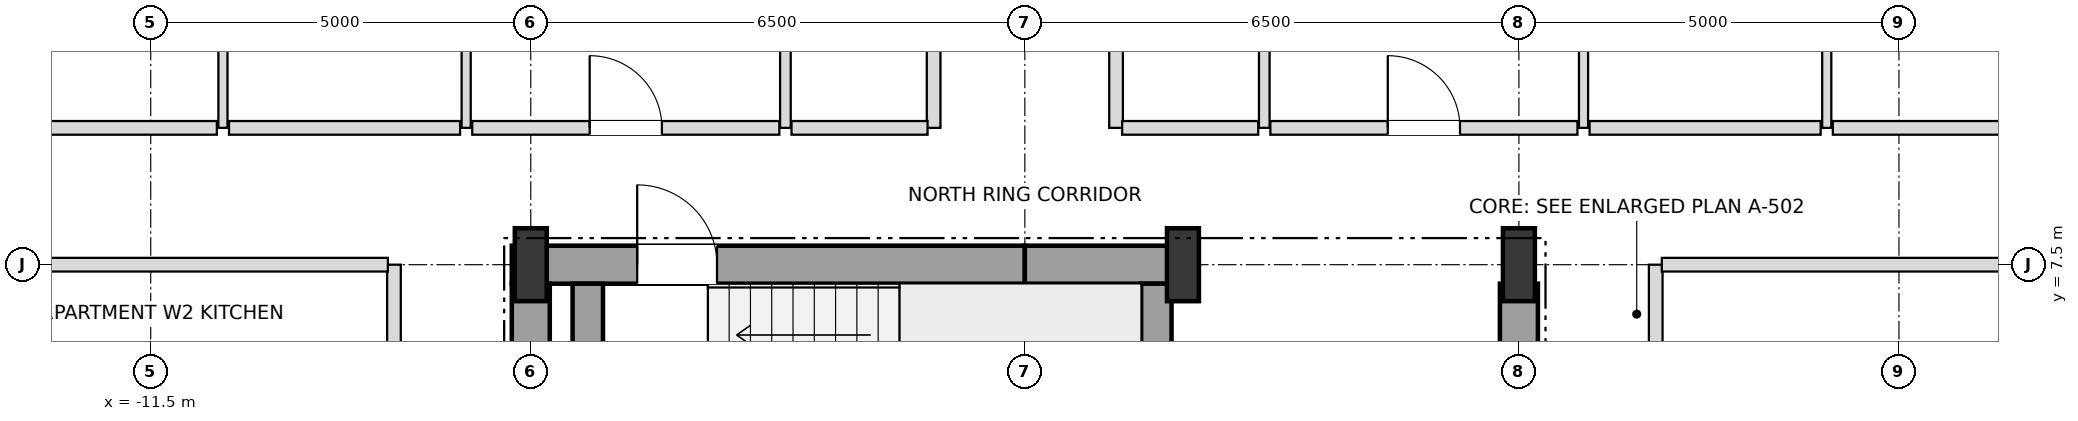
"""IFC4 building model, lengths in metres.
Left out: names, types, materials, properties, quantities, classifications, styles, units other than length and angle.
Written with IfcOpenShell. Run it as: python <this file> out.ifc"""

import sys

from ifc_helpers import new_model, si_unit, direction, frame, frame_2d, origin, origin_2d, place, context, subcontext, project, spatial, rectangle, i_section, extrude, element, fill, save


model = new_model("IFC4")
c1 = context("Model", 3, precision=1e-05, world=origin(), true_north=direction((0.0, 1.0)))
c2 = subcontext(c1, "Body", "Model", "MODEL_VIEW")
j1 = project(units=[si_unit("LENGTHUNIT", "METRE"), si_unit("PLANEANGLEUNIT", "RADIAN")], contexts=[c1])
p1 = place(None, origin())
s1 = spatial("IfcSite", under=j1, at=p1, CompositionType="ELEMENT")
p2 = place(p1, origin())
s2 = spatial("IfcBuilding", under=s1, at=p2, CompositionType="ELEMENT")
p3 = place(p2, frame((0.0, 0.0, 99.0)))
s3 = spatial("IfcBuildingStorey", under=s2, at=p3, CompositionType="ELEMENT", Elevation=99.0)
for number, where, z_axis, x_axis in (
    (1, (-6.5, 7.5, 0.0), (0.0, 0.0, 1.0), (1.0, 0.0, 0.0)),
    (2, (2.08, 7.5, 0.0), (0.0, 0.0, 1.0), (1.0, 0.0, 0.0)),
    (3, (6.5, 7.5, 0.0), (0.0, 0.0, 1.0), (1.0, 0.0, 0.0)),
):
    element("IfcColumn", number, at=place(p3, frame(where, z_axis=z_axis, x_axis=x_axis)), inside=s3, PredefinedType="COLUMN", context=c2, shape_type="SweptSolid", body=[
        extrude(i_section(OverallWidth=0.42, OverallDepth=0.96, WebThickness=0.022, FlangeThickness=0.034, at=origin_2d()), origin(), (0.0, 0.0, 1.0), 3.6),
    ])
p4 = place(p3, frame((-6.75, 7.5, 0.0), z_axis=(0.0, 0.0, 1.0), x_axis=(1.0, 0.0, 0.0)))
e4 = element("IfcWall", 4, at=p4, inside=s3, PredefinedType="SHEAR", context=c2, shape_type="SweptSolid", body=[
    extrude(rectangle(XDim=6.75, YDim=0.5, at=frame_2d((3.375, 0.0))), origin(), (0.0, 0.0, 1.0), 3.38),
])
p5 = place(p4, frame((1.65, 0.0, 0.0)))
e5 = element("IfcOpeningElement", 5, at=p5, cuts=e4, PredefinedType="OPENING", context=c2, shape_type="SweptSolid", body=[
    extrude(rectangle(XDim=1.05, YDim=2.15, at=frame_2d((0.525, 1.075))), frame((0.0, 0.26, 0.0), z_axis=(0.0, -1.0, 0.0), x_axis=(1.0, 0.0, 0.0)), (0.0, 0.0, 1.0), 0.52),
])
p6 = place(p3, frame((0.0, 7.5, 0.0), z_axis=(0.0, 0.0, 1.0), x_axis=(1.0, 0.0, 0.0)))
e6 = element("IfcWall", 6, at=p6, inside=s3, PredefinedType="SHEAR", context=c2, shape_type="SweptSolid", body=[
    extrude(rectangle(XDim=2.08, YDim=0.5, at=frame_2d((1.04, 0.0))), origin(), (0.0, 0.0, 1.0), 3.38),
])
for number, where, z_axis, x_axis in (
    (7, (-6.5, 3.95, 0.0), (0.0, 0.0, 1.0), (0.0, 1.0, 0.0)),
    (8, (6.5, 3.95, 0.0), (0.0, 0.0, 1.0), (0.0, 1.0, 0.0)),
):
    element("IfcWall", number, at=place(p3, frame(where, z_axis=z_axis, x_axis=x_axis)), inside=s3, PredefinedType="SHEAR", context=c2, shape_type="SweptSolid", body=[
        extrude(rectangle(XDim=3.3, YDim=0.5, at=frame_2d((1.65, 0.0))), origin(), (0.0, 0.0, 1.0), 3.38),
    ])
for number, where, z_axis, x_axis in (
    (9, (1.73, 3.95, 0.0), (0.0, 0.0, 1.0), (0.0, 1.0, 0.0)),
    (10, (-5.75, 3.95, 0.0), (0.0, 0.0, 1.0), (0.0, 1.0, 0.0)),
):
    element("IfcWall", number, at=place(p3, frame(where, z_axis=z_axis, x_axis=x_axis)), inside=s3, PredefinedType="SHEAR", context=c2, shape_type="SweptSolid", body=[
        extrude(rectangle(XDim=3.3, YDim=0.4, at=frame_2d((1.65, 0.0))), origin(), (0.0, 0.0, 1.0), 3.38),
    ])
p7 = place(p3, frame((-10.55, 9.3, 0.0), z_axis=(0.0, 0.0, 1.0), x_axis=(0.0, 1.0, 0.0)))
e11 = element("IfcWall", 11, at=p7, inside=s3, PredefinedType="PARTITIONING", context=c2, shape_type="SweptSolid", body=[
    extrude(rectangle(XDim=13.85, YDim=0.12, at=frame_2d((6.925, 0.0))), origin(), (0.0, 0.0, 1.0), 2.816),
])
p8 = place(p7, frame((4.249, 0.0, 0.0)))
e12 = element("IfcOpeningElement", 12, at=p8, cuts=e11, PredefinedType="OPENING", context=c2, shape_type="SweptSolid", body=[
    extrude(rectangle(XDim=0.9, YDim=2.1, at=frame_2d((0.45, 1.05))), frame((0.0, 0.07, 0.0), z_axis=(0.0, -1.0, 0.0), x_axis=(1.0, 0.0, 0.0)), (0.0, 0.0, 1.0), 0.14),
])
p9 = place(p7, frame((11.551, 0.0, 0.0)))
e13 = element("IfcOpeningElement", 13, at=p9, cuts=e11, PredefinedType="OPENING", context=c2, shape_type="SweptSolid", body=[
    extrude(rectangle(XDim=0.9, YDim=2.1, at=frame_2d((0.45, 1.05))), frame((0.0, 0.07, 0.0), z_axis=(0.0, -1.0, 0.0), x_axis=(1.0, 0.0, 0.0)), (0.0, 0.0, 1.0), 0.14),
])
p10 = place(p3, frame((-8.3, -7.5, 0.0), z_axis=(0.0, 0.0, 1.0), x_axis=(0.0, 1.0, 0.0)))
e14 = element("IfcWall", 14, at=p10, inside=s3, PredefinedType="PARTITIONING", context=c2, shape_type="SweptSolid", body=[
    extrude(rectangle(XDim=15.0, YDim=0.18, at=frame_2d((7.5, 0.0))), origin(), (0.0, 0.0, 1.0), 3.38),
])
p11 = place(p10, frame((3.145, 0.0, 0.0)))
e15 = element("IfcOpeningElement", 15, at=p11, cuts=e14, PredefinedType="OPENING", context=c2, shape_type="SweptSolid", body=[
    extrude(rectangle(XDim=0.95, YDim=2.15, at=frame_2d((0.475, 1.075))), frame((0.0, 0.1, 0.0), z_axis=(0.0, -1.0, 0.0), x_axis=(1.0, 0.0, 0.0)), (0.0, 0.0, 1.0), 0.2),
])
p12 = place(p10, frame((10.645, 0.0, 0.0)))
e16 = element("IfcOpeningElement", 16, at=p12, cuts=e14, PredefinedType="OPENING", context=c2, shape_type="SweptSolid", body=[
    extrude(rectangle(XDim=0.95, YDim=2.15, at=frame_2d((0.475, 1.075))), frame((0.0, 0.1, 0.0), z_axis=(0.0, -1.0, 0.0), x_axis=(1.0, 0.0, 0.0)), (0.0, 0.0, 1.0), 0.2),
])
p13 = place(p3, frame((-7.35, 9.3, 0.0), z_axis=(0.0, 0.0, 1.0), x_axis=(0.0, 1.0, 0.0)))
e17 = element("IfcWall", 17, at=p13, inside=s3, PredefinedType="PARTITIONING", context=c2, shape_type="SweptSolid", body=[
    extrude(rectangle(XDim=7.85, YDim=0.12, at=frame_2d((3.925, 0.0))), origin(), (0.0, 0.0, 1.0), 2.816),
])
p14 = place(p13, frame((3.445, 0.0, 0.0)))
e18 = element("IfcOpeningElement", 18, at=p14, cuts=e17, PredefinedType="OPENING", context=c2, shape_type="SweptSolid", body=[
    extrude(rectangle(XDim=0.95, YDim=2.1, at=frame_2d((0.475, 1.05))), frame((0.0, 0.07, 0.0), z_axis=(0.0, -1.0, 0.0), x_axis=(1.0, 0.0, 0.0)), (0.0, 0.0, 1.0), 0.14),
])
p15 = place(p3, frame((-3.15, 9.3, 0.0), z_axis=(0.0, 0.0, 1.0), x_axis=(0.0, 1.0, 0.0)))
e19 = element("IfcWall", 19, at=p15, inside=s3, PredefinedType="PARTITIONING", context=c2, shape_type="SweptSolid", body=[
    extrude(rectangle(XDim=7.85, YDim=0.14, at=frame_2d((3.925, 0.0))), origin(), (0.0, 0.0, 1.0), 3.38),
])
p16 = place(p15, frame((3.47, 0.0, 0.0)))
e20 = element("IfcOpeningElement", 20, at=p16, cuts=e19, PredefinedType="OPENING", context=c2, shape_type="SweptSolid", body=[
    extrude(rectangle(XDim=0.9, YDim=2.1, at=frame_2d((0.45, 1.05))), frame((0.0, 0.08, 0.0), z_axis=(0.0, -1.0, 0.0), x_axis=(1.0, 0.0, 0.0)), (0.0, 0.0, 1.0), 0.16),
])
for number, where, z_axis, x_axis in (
    (21, (-1.2, 9.3, 0.0), (0.0, 0.0, 1.0), (0.0, 1.0, 0.0)),
    (22, (1.2, 9.3, 0.0), (0.0, 0.0, 1.0), (0.0, 1.0, 0.0)),
):
    element("IfcWall", number, at=place(p3, frame(where, z_axis=z_axis, x_axis=x_axis)), inside=s3, PredefinedType="PARTITIONING", context=c2, shape_type="SweptSolid", body=[
        extrude(rectangle(XDim=13.85, YDim=0.18, at=frame_2d((6.925, 0.0))), origin(), (0.0, 0.0, 1.0), 2.816),
    ])
p17 = place(p3, frame((3.15, 9.3, 0.0), z_axis=(0.0, 0.0, 1.0), x_axis=(0.0, 1.0, 0.0)))
e23 = element("IfcWall", 23, at=p17, inside=s3, PredefinedType="PARTITIONING", context=c2, shape_type="SweptSolid", body=[
    extrude(rectangle(XDim=7.85, YDim=0.14, at=frame_2d((3.925, 0.0))), origin(), (0.0, 0.0, 1.0), 3.38),
])
p18 = place(p17, frame((3.47, 0.0, 0.0)))
e24 = element("IfcOpeningElement", 24, at=p18, cuts=e23, PredefinedType="OPENING", context=c2, shape_type="SweptSolid", body=[
    extrude(rectangle(XDim=0.9, YDim=2.1, at=frame_2d((0.45, 1.05))), frame((0.0, 0.08, 0.0), z_axis=(0.0, -1.0, 0.0), x_axis=(1.0, 0.0, 0.0)), (0.0, 0.0, 1.0), 0.16),
])
p19 = place(p3, frame((7.35, 9.3, 0.0), z_axis=(0.0, 0.0, 1.0), x_axis=(0.0, 1.0, 0.0)))
e25 = element("IfcWall", 25, at=p19, inside=s3, PredefinedType="PARTITIONING", context=c2, shape_type="SweptSolid", body=[
    extrude(rectangle(XDim=13.85, YDim=0.12, at=frame_2d((6.925, 0.0))), origin(), (0.0, 0.0, 1.0), 2.816),
])
p20 = place(p19, frame((3.445, 0.0, 0.0)))
e26 = element("IfcOpeningElement", 26, at=p20, cuts=e25, PredefinedType="OPENING", context=c2, shape_type="SweptSolid", body=[
    extrude(rectangle(XDim=0.95, YDim=2.1, at=frame_2d((0.475, 1.05))), frame((0.0, 0.07, 0.0), z_axis=(0.0, -1.0, 0.0), x_axis=(1.0, 0.0, 0.0)), (0.0, 0.0, 1.0), 0.14),
])
p21 = place(p19, frame((11.551, 0.0, 0.0)))
e27 = element("IfcOpeningElement", 27, at=p21, cuts=e25, PredefinedType="OPENING", context=c2, shape_type="SweptSolid", body=[
    extrude(rectangle(XDim=0.9, YDim=2.1, at=frame_2d((0.45, 1.05))), frame((0.0, 0.07, 0.0), z_axis=(0.0, -1.0, 0.0), x_axis=(1.0, 0.0, 0.0)), (0.0, 0.0, 1.0), 0.14),
])
p22 = place(p3, frame((8.3, -7.5, 0.0), z_axis=(0.0, 0.0, 1.0), x_axis=(0.0, 1.0, 0.0)))
e28 = element("IfcWall", 28, at=p22, inside=s3, PredefinedType="PARTITIONING", context=c2, shape_type="SweptSolid", body=[
    extrude(rectangle(XDim=15.0, YDim=0.18, at=frame_2d((7.5, 0.0))), origin(), (0.0, 0.0, 1.0), 3.38),
])
p23 = place(p22, frame((3.475, 0.0, 0.0)))
e29 = element("IfcOpeningElement", 29, at=p23, cuts=e28, PredefinedType="OPENING", context=c2, shape_type="SweptSolid", body=[
    extrude(rectangle(XDim=0.95, YDim=2.15, at=frame_2d((0.475, 1.075))), frame((0.0, 0.1, 0.0), z_axis=(0.0, -1.0, 0.0), x_axis=(1.0, 0.0, 0.0)), (0.0, 0.0, 1.0), 0.2),
])
p24 = place(p3, frame((10.55, 9.3, 0.0), z_axis=(0.0, 0.0, 1.0), x_axis=(0.0, 1.0, 0.0)))
e30 = element("IfcWall", 30, at=p24, inside=s3, PredefinedType="PARTITIONING", context=c2, shape_type="SweptSolid", body=[
    extrude(rectangle(XDim=13.85, YDim=0.12, at=frame_2d((6.925, 0.0))), origin(), (0.0, 0.0, 1.0), 2.816),
])
p25 = place(p24, frame((4.219, 0.0, 0.0)))
e31 = element("IfcOpeningElement", 31, at=p25, cuts=e30, PredefinedType="OPENING", context=c2, shape_type="SweptSolid", body=[
    extrude(rectangle(XDim=0.95, YDim=2.1, at=frame_2d((0.475, 1.05))), frame((0.0, 0.07, 0.0), z_axis=(0.0, -1.0, 0.0), x_axis=(1.0, 0.0, 0.0)), (0.0, 0.0, 1.0), 0.14),
])
p26 = place(p24, frame((11.551, 0.0, 0.0)))
e32 = element("IfcOpeningElement", 32, at=p26, cuts=e30, PredefinedType="OPENING", context=c2, shape_type="SweptSolid", body=[
    extrude(rectangle(XDim=0.9, YDim=2.1, at=frame_2d((0.45, 1.05))), frame((0.0, 0.07, 0.0), z_axis=(0.0, -1.0, 0.0), x_axis=(1.0, 0.0, 0.0)), (0.0, 0.0, 1.0), 0.14),
])
for number, where, z_axis, x_axis in (
    (33, (-14.27, 7.5, 0.0), (0.0, 0.0, 1.0), (1.0, 0.0, 0.0)),
    (34, (8.38, 7.5, 0.0), (0.0, 0.0, 1.0), (1.0, 0.0, 0.0)),
):
    element("IfcWall", number, at=place(p3, frame(where, z_axis=z_axis, x_axis=x_axis)), inside=s3, PredefinedType="PARTITIONING", context=c2, shape_type="SweptSolid", body=[
        extrude(rectangle(XDim=5.89, YDim=0.18, at=frame_2d((2.945, 0.0))), origin(), (0.0, 0.0, 1.0), 2.816),
    ])
p27 = place(p3, frame((-15.57, 9.3, 0.0), z_axis=(0.0, 0.0, 1.0), x_axis=(1.0, 0.0, 0.0)))
e35 = element("IfcWall", 35, at=p27, inside=s3, PredefinedType="PARTITIONING", context=c2, shape_type="SweptSolid", body=[
    extrude(rectangle(XDim=4.94, YDim=0.18, at=frame_2d((2.47, 0.0))), origin(), (0.0, 0.0, 1.0), 3.38),
])
p28 = place(p3, frame((-10.47, 9.3, 0.0), z_axis=(0.0, 0.0, 1.0), x_axis=(1.0, 0.0, 0.0)))
e36 = element("IfcWall", 36, at=p28, inside=s3, PredefinedType="PARTITIONING", context=c2, shape_type="SweptSolid", body=[
    extrude(rectangle(XDim=3.04, YDim=0.18, at=frame_2d((1.52, 0.0))), origin(), (0.0, 0.0, 1.0), 3.38),
])
p29 = place(p3, frame((-7.27, 9.3, 0.0), z_axis=(0.0, 0.0, 1.0), x_axis=(1.0, 0.0, 0.0)))
e37 = element("IfcWall", 37, at=p29, inside=s3, PredefinedType="PARTITIONING", context=c2, shape_type="SweptSolid", body=[
    extrude(rectangle(XDim=4.04, YDim=0.18, at=frame_2d((2.02, 0.0))), origin(), (0.0, 0.0, 1.0), 2.816),
])
p30 = place(p29, frame((1.545, 0.0, 0.0)))
e38 = element("IfcOpeningElement", 38, at=p30, cuts=e37, PredefinedType="OPENING", context=c2, shape_type="SweptSolid", body=[
    extrude(rectangle(XDim=0.95, YDim=2.15, at=frame_2d((0.475, 1.075))), frame((0.0, 0.1, 0.0), z_axis=(0.0, -1.0, 0.0), x_axis=(1.0, 0.0, 0.0)), (0.0, 0.0, 1.0), 0.2),
])
for number, where, z_axis, x_axis in (
    (39, (-3.07, 9.3, 0.0), (0.0, 0.0, 1.0), (1.0, 0.0, 0.0)),
    (40, (1.28, 9.3, 0.0), (0.0, 0.0, 1.0), (1.0, 0.0, 0.0)),
):
    element("IfcWall", number, at=place(p3, frame(where, z_axis=z_axis, x_axis=x_axis)), inside=s3, PredefinedType="PARTITIONING", context=c2, shape_type="SweptSolid", body=[
        extrude(rectangle(XDim=1.79, YDim=0.18, at=frame_2d((0.895, 0.0))), origin(), (0.0, 0.0, 1.0), 3.38),
    ])
p31 = place(p3, frame((3.23, 9.3, 0.0), z_axis=(0.0, 0.0, 1.0), x_axis=(1.0, 0.0, 0.0)))
e41 = element("IfcWall", 41, at=p31, inside=s3, PredefinedType="PARTITIONING", context=c2, shape_type="SweptSolid", body=[
    extrude(rectangle(XDim=4.04, YDim=0.18, at=frame_2d((2.02, 0.0))), origin(), (0.0, 0.0, 1.0), 2.816),
])
p32 = place(p31, frame((1.545, 0.0, 0.0)))
e42 = element("IfcOpeningElement", 42, at=p32, cuts=e41, PredefinedType="OPENING", context=c2, shape_type="SweptSolid", body=[
    extrude(rectangle(XDim=0.95, YDim=2.15, at=frame_2d((0.475, 1.075))), frame((0.0, 0.1, 0.0), z_axis=(0.0, -1.0, 0.0), x_axis=(1.0, 0.0, 0.0)), (0.0, 0.0, 1.0), 0.2),
])
p33 = place(p3, frame((7.43, 9.3, 0.0), z_axis=(0.0, 0.0, 1.0), x_axis=(1.0, 0.0, 0.0)))
e43 = element("IfcWall", 43, at=p33, inside=s3, PredefinedType="PARTITIONING", context=c2, shape_type="SweptSolid", body=[
    extrude(rectangle(XDim=3.04, YDim=0.18, at=frame_2d((1.52, 0.0))), origin(), (0.0, 0.0, 1.0), 3.38),
])
p34 = place(p3, frame((10.63, 9.3, 0.0), z_axis=(0.0, 0.0, 1.0), x_axis=(1.0, 0.0, 0.0)))
e44 = element("IfcWall", 44, at=p34, inside=s3, PredefinedType="PARTITIONING", context=c2, shape_type="SweptSolid", body=[
    extrude(rectangle(XDim=4.94, YDim=0.18, at=frame_2d((2.47, 0.0))), origin(), (0.0, 0.0, 1.0), 3.38),
])
p35 = place(p5, origin())
e45 = element("IfcDoor", 45, at=p35, inside=s3, OperationType="SINGLE_SWING_LEFT", PredefinedType="DOOR", context=c2, shape_type="SweptSolid", body=[
    extrude(rectangle(XDim=1.05, YDim=2.15, at=frame_2d((0.525, 1.075))), frame((0.0, 0.025, 0.0), z_axis=(0.0, -1.0, 0.0), x_axis=(1.0, 0.0, 0.0)), (0.0, 0.0, 1.0), 0.05),
])
fill(e5, e45)
p36 = place(p30, origin())
e46 = element("IfcDoor", 46, at=p36, inside=s3, OperationType="SINGLE_SWING_LEFT", PredefinedType="DOOR", context=c2, shape_type="SweptSolid", body=[
    extrude(rectangle(XDim=0.95, YDim=2.15, at=frame_2d((0.475, 1.075))), frame((0.0, 0.025, 0.0), z_axis=(0.0, -1.0, 0.0), x_axis=(1.0, 0.0, 0.0)), (0.0, 0.0, 1.0), 0.05),
])
fill(e38, e46)
p37 = place(p32, origin())
e47 = element("IfcDoor", 47, at=p37, inside=s3, OperationType="SINGLE_SWING_LEFT", PredefinedType="DOOR", context=c2, shape_type="SweptSolid", body=[
    extrude(rectangle(XDim=0.95, YDim=2.15, at=frame_2d((0.475, 1.075))), frame((0.0, 0.025, 0.0), z_axis=(0.0, -1.0, 0.0), x_axis=(1.0, 0.0, 0.0)), (0.0, 0.0, 1.0), 0.05),
])
fill(e42, e47)
save(model, sys.argv[1])
